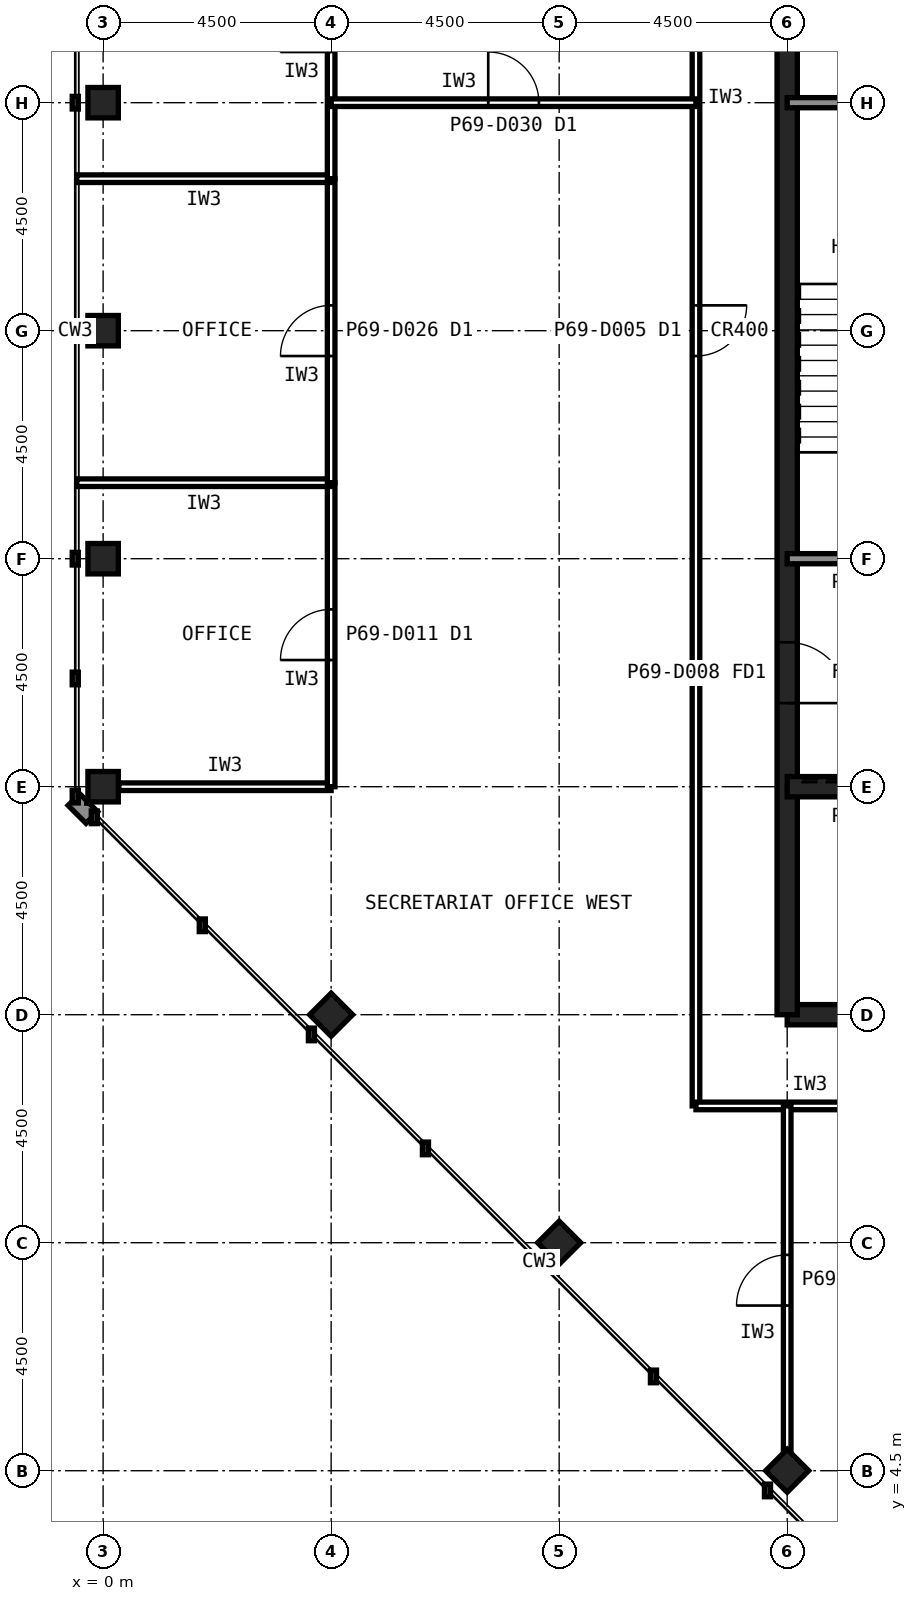
"""IFC4 building model, lengths in metres.
Left out: names, types, materials, properties, quantities, classifications, styles, units other than length and angle.
Written with IfcOpenShell. Run it as: python <this file> out.ifc"""

import sys

from ifc_helpers import new_model, si_unit, direction, frame, frame_2d, origin, origin_2d, place, context, subcontext, project, spatial, rectangle, hollow_rectangle, extrude, element, fill, save


model = new_model("IFC4")
c1 = context("Model", 3, precision=1e-05, world=origin(), true_north=direction((0.0, 1.0)))
c2 = subcontext(c1, "Body", "Model", "MODEL_VIEW")
j1 = project(units=[si_unit("LENGTHUNIT", "METRE"), si_unit("PLANEANGLEUNIT", "RADIAN")], contexts=[c1])
p1 = place(None, origin())
s1 = spatial("IfcSite", under=j1, at=p1, CompositionType="ELEMENT")
p2 = place(p1, origin())
s2 = spatial("IfcBuilding", under=s1, at=p2, CompositionType="ELEMENT")
p3 = place(p2, frame((0.0, 0.0, 286.6)))
s3 = spatial("IfcBuildingStorey", under=s2, at=p3, CompositionType="ELEMENT", Elevation=286.6)
for number, where, z_axis, x_axis in (
    (1, (0.0, 31.5, 0.0), (0.0, 0.0, 1.0), (1.0, 0.0, 0.0)),
    (2, (0.0, 27.0, 0.0), (0.0, 0.0, 1.0), (1.0, 0.0, 0.0)),
    (3, (0.0, 22.5, 0.0), (0.0, 0.0, 1.0), (1.0, 0.0, 0.0)),
    (4, (0.0, 18.0, 0.0), (0.0, 0.0, 1.0), (1.0, 0.0, 0.0)),
    (5, (13.5, 4.5, 0.0), (0.0, 0.0, 1.0), (0.707, 0.707, 0.0)),
    (6, (9.0, 9.0, 0.0), (0.0, 0.0, 1.0), (0.707, 0.707, 0.0)),
    (7, (4.5, 13.5, 0.0), (0.0, 0.0, 1.0), (0.707, 0.707, 0.0)),
):
    element("IfcColumn", number, at=place(p3, frame(where, z_axis=z_axis, x_axis=x_axis)), inside=s3, PredefinedType="COLUMN", context=c2, shape_type="SweptSolid", body=[
        extrude(hollow_rectangle(XDim=0.6, YDim=0.6, WallThickness=0.028, at=origin_2d()), origin(), (0.0, 0.0, 1.0), 4.0),
    ])
p4 = place(p3, frame((13.5, 13.5, 0.0), z_axis=(0.0, 0.0, 1.0), x_axis=(1.0, 0.0, 0.0)))
e8 = element("IfcWall", 8, at=p4, inside=s3, PredefinedType="SHEAR", context=c2, shape_type="SweptSolid", body=[
    extrude(rectangle(XDim=27.0, YDim=0.4, at=frame_2d((13.5, 0.0))), origin(), (0.0, 0.0, 1.0), 4.0),
])
p5 = place(p3, frame((13.5, 40.5, 0.0), z_axis=(0.0, 0.0, 1.0), x_axis=(0.0, -1.0, 0.0)))
e9 = element("IfcWall", 9, at=p5, inside=s3, PredefinedType="SHEAR", context=c2, shape_type="SweptSolid", body=[
    extrude(rectangle(XDim=27.0, YDim=0.4, at=frame_2d((13.5, 0.0))), origin(), (0.0, 0.0, 1.0), 4.0),
])
p6 = place(p5, frame((19.65, 0.0, 0.0)))
e10 = element("IfcOpeningElement", 10, at=p6, cuts=e9, PredefinedType="OPENING", context=c2, shape_type="SweptSolid", body=[
    extrude(rectangle(XDim=1.2, YDim=2.1, at=frame_2d((0.6, 1.05))), frame((0.0, 0.21, 0.0), z_axis=(0.0, -1.0, 0.0), x_axis=(1.0, 0.0, 0.0)), (0.0, 0.0, 1.0), 0.42),
])
p7 = place(p5, frame((5.85, 0.0, 0.0)))
e11 = element("IfcOpeningElement", 11, at=p7, cuts=e9, PredefinedType="OPENING", context=c2, shape_type="SweptSolid", body=[
    extrude(rectangle(XDim=1.8, YDim=2.1, at=frame_2d((0.9, 1.05))), frame((0.0, 0.21, 0.0), z_axis=(0.0, -1.0, 0.0), x_axis=(1.0, 0.0, 0.0)), (0.0, 0.0, 1.0), 0.42),
])
p8 = place(p3, frame((13.5, 18.0, 0.0), z_axis=(0.0, 0.0, 1.0), x_axis=(1.0, 0.0, 0.0)))
e12 = element("IfcWall", 12, at=p8, inside=s3, PredefinedType="SHEAR", context=c2, shape_type="SweptSolid", body=[
    extrude(rectangle(XDim=27.0, YDim=0.4, at=frame_2d((13.5, 0.0))), origin(), (0.0, 0.0, 1.0), 4.0),
])
p9 = place(p8, frame((24.3, 0.0, 0.0)))
e13 = element("IfcOpeningElement", 13, at=p9, cuts=e12, PredefinedType="OPENING", context=c2, shape_type="SweptSolid", body=[
    extrude(rectangle(XDim=0.9, YDim=2.1, at=frame_2d((0.45, 1.05))), frame((0.0, 0.21, 0.0), z_axis=(0.0, -1.0, 0.0), x_axis=(1.0, 0.0, 0.0)), (0.0, 0.0, 1.0), 0.42),
])
p10 = place(p8, frame((5.45, 0.0, 0.0)))
e14 = element("IfcOpeningElement", 14, at=p10, cuts=e12, PredefinedType="OPENING", context=c2, shape_type="SweptSolid", body=[
    extrude(rectangle(XDim=1.1, YDim=2.1, at=frame_2d((0.55, 1.05))), frame((0.0, 0.21, 0.0), z_axis=(0.0, -1.0, 0.0), x_axis=(1.0, 0.0, 0.0)), (0.0, 0.0, 1.0), 0.42),
])
p11 = place(p8, frame((8.45, 0.0, 0.0)))
e15 = element("IfcOpeningElement", 15, at=p11, cuts=e12, PredefinedType="OPENING", context=c2, shape_type="SweptSolid", body=[
    extrude(rectangle(XDim=1.1, YDim=2.1, at=frame_2d((0.55, 1.05))), frame((0.0, 0.21, 0.0), z_axis=(0.0, -1.0, 0.0), x_axis=(1.0, 0.0, 0.0)), (0.0, 0.0, 1.0), 0.42),
])
p12 = place(p8, frame((11.45, 0.0, 0.0)))
e16 = element("IfcOpeningElement", 16, at=p12, cuts=e12, PredefinedType="OPENING", context=c2, shape_type="SweptSolid", body=[
    extrude(rectangle(XDim=1.1, YDim=2.1, at=frame_2d((0.55, 1.05))), frame((0.0, 0.21, 0.0), z_axis=(0.0, -1.0, 0.0), x_axis=(1.0, 0.0, 0.0)), (0.0, 0.0, 1.0), 0.42),
])
p13 = place(p8, frame((14.45, 0.0, 0.0)))
e17 = element("IfcOpeningElement", 17, at=p13, cuts=e12, PredefinedType="OPENING", context=c2, shape_type="SweptSolid", body=[
    extrude(rectangle(XDim=1.1, YDim=2.1, at=frame_2d((0.55, 1.05))), frame((0.0, 0.21, 0.0), z_axis=(0.0, -1.0, 0.0), x_axis=(1.0, 0.0, 0.0)), (0.0, 0.0, 1.0), 0.42),
])
p14 = place(p8, frame((17.45, 0.0, 0.0)))
e18 = element("IfcOpeningElement", 18, at=p14, cuts=e12, PredefinedType="OPENING", context=c2, shape_type="SweptSolid", body=[
    extrude(rectangle(XDim=1.1, YDim=2.1, at=frame_2d((0.55, 1.05))), frame((0.0, 0.21, 0.0), z_axis=(0.0, -1.0, 0.0), x_axis=(1.0, 0.0, 0.0)), (0.0, 0.0, 1.0), 0.42),
])
p15 = place(p8, frame((20.45, 0.0, 0.0)))
e19 = element("IfcOpeningElement", 19, at=p15, cuts=e12, PredefinedType="OPENING", context=c2, shape_type="SweptSolid", body=[
    extrude(rectangle(XDim=1.1, YDim=2.1, at=frame_2d((0.55, 1.05))), frame((0.0, 0.21, 0.0), z_axis=(0.0, -1.0, 0.0), x_axis=(1.0, 0.0, 0.0)), (0.0, 0.0, 1.0), 0.42),
])
p16 = place(p8, frame((1.6, 0.0, 0.0)))
e20 = element("IfcOpeningElement", 20, at=p16, cuts=e12, PredefinedType="OPENING", context=c2, shape_type="SweptSolid", body=[
    extrude(rectangle(XDim=1.3, YDim=2.2, at=frame_2d((0.65, 1.1))), frame((0.0, 0.21, 0.0), z_axis=(0.0, -1.0, 0.0), x_axis=(1.0, 0.0, 0.0)), (0.0, 0.0, 1.0), 0.42),
])
p17 = place(p3, frame((13.5, 22.5, 0.0), z_axis=(0.0, 0.0, 1.0), x_axis=(1.0, 0.0, 0.0)))
e21 = element("IfcWall", 21, at=p17, inside=s3, PredefinedType="SOLIDWALL", context=c2, shape_type="SweptSolid", body=[
    extrude(rectangle(XDim=27.0, YDim=0.2, at=frame_2d((13.5, 0.0))), origin(), (0.0, 0.0, 1.0), 3.84),
])
p18 = place(p17, frame((1.65, 0.0, 0.0)))
e22 = element("IfcOpeningElement", 22, at=p18, cuts=e21, PredefinedType="OPENING", context=c2, shape_type="SweptSolid", body=[
    extrude(rectangle(XDim=1.2, YDim=2.1, at=frame_2d((0.6, 1.05))), frame((0.0, 0.11, 0.0), z_axis=(0.0, -1.0, 0.0), x_axis=(1.0, 0.0, 0.0)), (0.0, 0.0, 1.0), 0.22),
])
p19 = place(p17, frame((6.025, 0.0, 0.0)))
e23 = element("IfcOpeningElement", 23, at=p19, cuts=e21, PredefinedType="OPENING", context=c2, shape_type="SweptSolid", body=[
    extrude(rectangle(XDim=1.0, YDim=2.1, at=frame_2d((0.5, 1.05))), frame((0.0, 0.11, 0.0), z_axis=(0.0, -1.0, 0.0), x_axis=(1.0, 0.0, 0.0)), (0.0, 0.0, 1.0), 0.22),
])
p20 = place(p17, frame((10.525, 0.0, 0.0)))
e24 = element("IfcOpeningElement", 24, at=p20, cuts=e21, PredefinedType="OPENING", context=c2, shape_type="SweptSolid", body=[
    extrude(rectangle(XDim=1.0, YDim=2.1, at=frame_2d((0.5, 1.05))), frame((0.0, 0.11, 0.0), z_axis=(0.0, -1.0, 0.0), x_axis=(1.0, 0.0, 0.0)), (0.0, 0.0, 1.0), 0.22),
])
p21 = place(p17, frame((19.75, 0.0, 0.0)))
e25 = element("IfcOpeningElement", 25, at=p21, cuts=e21, PredefinedType="OPENING", context=c2, shape_type="SweptSolid", body=[
    extrude(rectangle(XDim=1.0, YDim=2.1, at=frame_2d((0.5, 1.05))), frame((0.0, 0.11, 0.0), z_axis=(0.0, -1.0, 0.0), x_axis=(1.0, 0.0, 0.0)), (0.0, 0.0, 1.0), 0.22),
])
p22 = place(p17, frame((15.05, 0.0, 0.0)))
e26 = element("IfcOpeningElement", 26, at=p22, cuts=e21, PredefinedType="OPENING", context=c2, shape_type="SweptSolid", body=[
    extrude(rectangle(XDim=1.4, YDim=2.4, at=frame_2d((0.7, 1.2))), frame((0.0, 0.11, 0.0), z_axis=(0.0, -1.0, 0.0), x_axis=(1.0, 0.0, 0.0)), (0.0, 0.0, 1.0), 0.22),
])
p23 = place(p3, frame((13.5, 31.5, 0.0), z_axis=(0.0, 0.0, 1.0), x_axis=(1.0, 0.0, 0.0)))
e27 = element("IfcWall", 27, at=p23, inside=s3, PredefinedType="SOLIDWALL", context=c2, shape_type="SweptSolid", body=[
    extrude(rectangle(XDim=27.0, YDim=0.2, at=frame_2d((13.5, 0.0))), origin(), (0.0, 0.0, 1.0), 3.84),
])
p24 = place(p23, frame((24.15, 0.0, 0.0)))
e28 = element("IfcOpeningElement", 28, at=p24, cuts=e27, PredefinedType="OPENING", context=c2, shape_type="SweptSolid", body=[
    extrude(rectangle(XDim=1.2, YDim=2.1, at=frame_2d((0.6, 1.05))), frame((0.0, 0.11, 0.0), z_axis=(0.0, -1.0, 0.0), x_axis=(1.0, 0.0, 0.0)), (0.0, 0.0, 1.0), 0.22),
])
p25 = place(p23, frame((15.3, 0.0, 0.0)))
e29 = element("IfcOpeningElement", 29, at=p25, cuts=e27, PredefinedType="OPENING", context=c2, shape_type="SweptSolid", body=[
    extrude(rectangle(XDim=0.9, YDim=2.1, at=frame_2d((0.45, 1.05))), frame((0.0, 0.11, 0.0), z_axis=(0.0, -1.0, 0.0), x_axis=(1.0, 0.0, 0.0)), (0.0, 0.0, 1.0), 0.22),
])
p26 = place(p23, frame((19.8, 0.0, 0.0)))
e30 = element("IfcOpeningElement", 30, at=p26, cuts=e27, PredefinedType="OPENING", context=c2, shape_type="SweptSolid", body=[
    extrude(rectangle(XDim=0.9, YDim=2.1, at=frame_2d((0.45, 1.05))), frame((0.0, 0.11, 0.0), z_axis=(0.0, -1.0, 0.0), x_axis=(1.0, 0.0, 0.0)), (0.0, 0.0, 1.0), 0.22),
])
p27 = place(p3, frame((11.7, 42.3, 0.0), z_axis=(0.0, 0.0, 1.0), x_axis=(0.0, -1.0, 0.0)))
e31 = element("IfcWall", 31, at=p27, inside=s3, PredefinedType="PARTITIONING", context=c2, shape_type="SweptSolid", body=[
    extrude(rectangle(XDim=30.6, YDim=0.15, at=frame_2d((15.3, 0.0))), origin(), (0.0, 0.0, 1.0), 3.84),
])
p28 = place(p27, frame((14.8, 0.0, 0.0)))
e32 = element("IfcOpeningElement", 32, at=p28, cuts=e31, PredefinedType="OPENING", context=c2, shape_type="SweptSolid", body=[
    extrude(rectangle(XDim=1.0, YDim=2.1, at=frame_2d((0.5, 1.05))), frame((0.0, 0.085, 0.0), z_axis=(0.0, -1.0, 0.0), x_axis=(1.0, 0.0, 0.0)), (0.0, 0.0, 1.0), 0.17),
])
p29 = place(p3, frame((11.7, 11.7, 0.0), z_axis=(0.0, 0.0, 1.0), x_axis=(1.0, 0.0, 0.0)))
e33 = element("IfcWall", 33, at=p29, inside=s3, PredefinedType="PARTITIONING", context=c2, shape_type="SweptSolid", body=[
    extrude(rectangle(XDim=4.5, YDim=0.15, at=frame_2d((2.25, 0.0))), origin(), (0.0, 0.0, 1.0), 3.84),
])
p30 = place(p3, frame((0.31, 18.0, 0.0), z_axis=(0.0, 0.0, 1.0), x_axis=(1.0, 0.0, 0.0)))
e34 = element("IfcWall", 34, at=p30, inside=s3, PredefinedType="PARTITIONING", context=c2, shape_type="SweptSolid", body=[
    extrude(rectangle(XDim=4.19, YDim=0.15, at=frame_2d((2.095, 0.0))), origin(), (0.0, 0.0, 1.0), 2.989),
])
p31 = place(p3, frame((4.5, 18.0, 0.0), z_axis=(0.0, 0.0, 1.0), x_axis=(0.0, 1.0, 0.0)))
e35 = element("IfcWall", 35, at=p31, inside=s3, PredefinedType="PARTITIONING", context=c2, shape_type="SweptSolid", body=[
    extrude(rectangle(XDim=6.0, YDim=0.15, at=frame_2d((3.0, 0.0))), origin(), (0.0, 0.0, 1.0), 3.84),
])
p32 = place(p31, frame((2.5, 0.0, 0.0)))
e36 = element("IfcOpeningElement", 36, at=p32, cuts=e35, PredefinedType="OPENING", context=c2, shape_type="SweptSolid", body=[
    extrude(rectangle(XDim=1.0, YDim=2.1, at=frame_2d((0.5, 1.05))), frame((0.0, 0.085, 0.0), z_axis=(0.0, -1.0, 0.0), x_axis=(1.0, 0.0, 0.0)), (0.0, 0.0, 1.0), 0.17),
])
p33 = place(p3, frame((4.5, 24.0, 0.0), z_axis=(0.0, 0.0, 1.0), x_axis=(-1.0, 0.0, 0.0)))
e37 = element("IfcWall", 37, at=p33, inside=s3, PredefinedType="PARTITIONING", context=c2, shape_type="SweptSolid", body=[
    extrude(rectangle(XDim=5.02, YDim=0.15, at=frame_2d((2.51, 0.0))), origin(), (0.0, 0.0, 1.0), 3.84),
])
p34 = place(p3, frame((4.5, 24.0, 0.0), z_axis=(0.0, 0.0, 1.0), x_axis=(0.0, 1.0, 0.0)))
e38 = element("IfcWall", 38, at=p34, inside=s3, PredefinedType="PARTITIONING", context=c2, shape_type="SweptSolid", body=[
    extrude(rectangle(XDim=6.0, YDim=0.15, at=frame_2d((3.0, 0.0))), origin(), (0.0, 0.0, 1.0), 3.84),
])
p35 = place(p34, frame((2.5, 0.0, 0.0)))
e39 = element("IfcOpeningElement", 39, at=p35, cuts=e38, PredefinedType="OPENING", context=c2, shape_type="SweptSolid", body=[
    extrude(rectangle(XDim=1.0, YDim=2.1, at=frame_2d((0.5, 1.05))), frame((0.0, 0.085, 0.0), z_axis=(0.0, -1.0, 0.0), x_axis=(1.0, 0.0, 0.0)), (0.0, 0.0, 1.0), 0.17),
])
p36 = place(p3, frame((4.5, 30.0, 0.0), z_axis=(0.0, 0.0, 1.0), x_axis=(-1.0, 0.0, 0.0)))
e40 = element("IfcWall", 40, at=p36, inside=s3, PredefinedType="PARTITIONING", context=c2, shape_type="SweptSolid", body=[
    extrude(rectangle(XDim=5.02, YDim=0.15, at=frame_2d((2.51, 0.0))), origin(), (0.0, 0.0, 1.0), 3.84),
])
p37 = place(p3, frame((4.5, 30.0, 0.0), z_axis=(0.0, 0.0, 1.0), x_axis=(0.0, 1.0, 0.0)))
e41 = element("IfcWall", 41, at=p37, inside=s3, PredefinedType="PARTITIONING", context=c2, shape_type="SweptSolid", body=[
    extrude(rectangle(XDim=6.0, YDim=0.15, at=frame_2d((3.0, 0.0))), origin(), (0.0, 0.0, 1.0), 3.84),
])
p38 = place(p37, frame((2.5, 0.0, 0.0)))
e42 = element("IfcOpeningElement", 42, at=p38, cuts=e41, PredefinedType="OPENING", context=c2, shape_type="SweptSolid", body=[
    extrude(rectangle(XDim=1.0, YDim=2.1, at=frame_2d((0.5, 1.05))), frame((0.0, 0.085, 0.0), z_axis=(0.0, -1.0, 0.0), x_axis=(1.0, 0.0, 0.0)), (0.0, 0.0, 1.0), 0.17),
])
p39 = place(p3, frame((13.5, 4.82, 0.0), z_axis=(0.0, 0.0, 1.0), x_axis=(0.0, 1.0, 0.0)))
e43 = element("IfcWall", 43, at=p39, inside=s3, PredefinedType="PARTITIONING", context=c2, shape_type="SweptSolid", body=[
    extrude(rectangle(XDim=6.88, YDim=0.15, at=frame_2d((3.44, 0.0))), origin(), (0.0, 0.0, 1.0), 2.989),
])
p40 = place(p39, frame((2.94, 0.0, 0.0)))
e44 = element("IfcOpeningElement", 44, at=p40, cuts=e43, PredefinedType="OPENING", context=c2, shape_type="SweptSolid", body=[
    extrude(rectangle(XDim=1.0, YDim=2.1, at=frame_2d((0.5, 1.05))), frame((0.0, 0.085, 0.0), z_axis=(0.0, -1.0, 0.0), x_axis=(1.0, 0.0, 0.0)), (0.0, 0.0, 1.0), 0.17),
])
p41 = place(p3, frame((4.5, 31.5, 0.0), z_axis=(0.0, 0.0, 1.0), x_axis=(1.0, 0.0, 0.0)))
e45 = element("IfcWall", 45, at=p41, inside=s3, PredefinedType="PARTITIONING", context=c2, shape_type="SweptSolid", body=[
    extrude(rectangle(XDim=7.2, YDim=0.15, at=frame_2d((3.6, 0.0))), origin(), (0.0, 0.0, 1.0), 2.989),
])
p42 = place(p41, frame((3.1, 0.0, 0.0)))
e46 = element("IfcOpeningElement", 46, at=p42, cuts=e45, PredefinedType="OPENING", context=c2, shape_type="SweptSolid", body=[
    extrude(rectangle(XDim=1.0, YDim=2.1, at=frame_2d((0.5, 1.05))), frame((0.0, 0.085, 0.0), z_axis=(0.0, -1.0, 0.0), x_axis=(1.0, 0.0, 0.0)), (0.0, 0.0, 1.0), 0.17),
])
p43 = place(p6, origin())
e47 = element("IfcDoor", 47, at=p43, inside=s3, OperationType="SINGLE_SWING_RIGHT", PredefinedType="DOOR", context=c2, shape_type="SweptSolid", body=[
    extrude(rectangle(XDim=1.2, YDim=2.1, at=frame_2d((0.6, 1.05))), frame((0.0, 0.025, 0.0), z_axis=(0.0, -1.0, 0.0), x_axis=(1.0, 0.0, 0.0)), (0.0, 0.0, 1.0), 0.05),
])
fill(e10, e47)
p44 = place(p28, origin())
e48 = element("IfcDoor", 48, at=p44, inside=s3, OperationType="SINGLE_SWING_LEFT", PredefinedType="DOOR", context=c2, shape_type="SweptSolid", body=[
    extrude(rectangle(XDim=1.0, YDim=2.1, at=frame_2d((0.5, 1.05))), frame((0.0, 0.025, 0.0), z_axis=(0.0, -1.0, 0.0), x_axis=(1.0, 0.0, 0.0)), (0.0, 0.0, 1.0), 0.05),
])
fill(e32, e48)
p45 = place(p32, origin())
e49 = element("IfcDoor", 49, at=p45, inside=s3, OperationType="SINGLE_SWING_LEFT", PredefinedType="DOOR", context=c2, shape_type="SweptSolid", body=[
    extrude(rectangle(XDim=1.0, YDim=2.1, at=frame_2d((0.5, 1.05))), frame((0.0, 0.025, 0.0), z_axis=(0.0, -1.0, 0.0), x_axis=(1.0, 0.0, 0.0)), (0.0, 0.0, 1.0), 0.05),
])
fill(e36, e49)
p46 = place(p35, origin())
e50 = element("IfcDoor", 50, at=p46, inside=s3, OperationType="SINGLE_SWING_LEFT", PredefinedType="DOOR", context=c2, shape_type="SweptSolid", body=[
    extrude(rectangle(XDim=1.0, YDim=2.1, at=frame_2d((0.5, 1.05))), frame((0.0, 0.025, 0.0), z_axis=(0.0, -1.0, 0.0), x_axis=(1.0, 0.0, 0.0)), (0.0, 0.0, 1.0), 0.05),
])
fill(e39, e50)
p47 = place(p40, origin())
e51 = element("IfcDoor", 51, at=p47, inside=s3, OperationType="SINGLE_SWING_LEFT", PredefinedType="DOOR", context=c2, shape_type="SweptSolid", body=[
    extrude(rectangle(XDim=1.0, YDim=2.1, at=frame_2d((0.5, 1.05))), frame((0.0, 0.025, 0.0), z_axis=(0.0, -1.0, 0.0), x_axis=(1.0, 0.0, 0.0)), (0.0, 0.0, 1.0), 0.05),
])
fill(e44, e51)
p48 = place(p42, origin())
e52 = element("IfcDoor", 52, at=p48, inside=s3, OperationType="SINGLE_SWING_LEFT", PredefinedType="DOOR", context=c2, shape_type="SweptSolid", body=[
    extrude(rectangle(XDim=1.0, YDim=2.1, at=frame_2d((0.5, 1.05))), frame((0.0, 0.025, 0.0), z_axis=(0.0, -1.0, 0.0), x_axis=(1.0, 0.0, 0.0)), (0.0, 0.0, 1.0), 0.05),
])
fill(e46, e52)
save(model, sys.argv[1])
